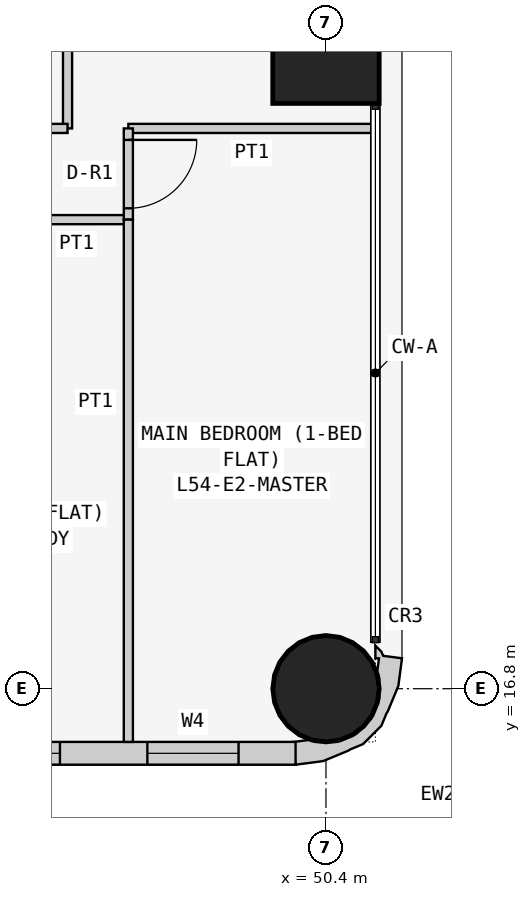
"""IFC4 building model, lengths in metres.
Left out: names, types, materials, properties, quantities, classifications, styles, units other than length and angle.
Written with IfcOpenShell. Run it as: python <this file> out.ifc"""

import sys

from ifc_helpers import new_model, si_unit, direction, frame, frame_2d, origin, origin_2d, place, context, subcontext, project, spatial, polyline, rectangle, circle, outline, extrude, element, fill, save


model = new_model("IFC4")
c1 = context("Model", 3, precision=1e-05, world=origin(), true_north=direction((0.0, 1.0)))
c2 = subcontext(c1, "Body", "Model", "MODEL_VIEW")
j1 = project(units=[si_unit("LENGTHUNIT", "METRE"), si_unit("PLANEANGLEUNIT", "RADIAN")], contexts=[c1])
p1 = place(None, origin())
s1 = spatial("IfcSite", under=j1, at=p1, CompositionType="ELEMENT")
p2 = place(p1, origin())
s2 = spatial("IfcBuilding", under=s1, at=p2, CompositionType="ELEMENT")
p3 = place(p2, frame((0.0, 0.0, 208.5)))
s3 = spatial("IfcBuildingStorey", under=s2, at=p3, CompositionType="ELEMENT", Elevation=208.5)
p4 = place(p3, frame((50.4, 16.8, 0.0), z_axis=(0.0, 0.0, 1.0), x_axis=(1.0, 0.0, 0.0)))
e1 = element("IfcColumn", 1, at=p4, inside=s3, PredefinedType="COLUMN", context=c2, shape_type="SweptSolid", body=[
    extrude(circle(Radius=0.7, at=origin_2d()), origin(), (0.0, 0.0, 1.0), 3.6),
])
p5 = place(p3, frame((50.4, 25.2, 0.0), z_axis=(0.0, 0.0, 1.0), x_axis=(1.0, 0.0, 0.0)))
e2 = element("IfcColumn", 2, at=p5, inside=s3, PredefinedType="COLUMN", context=c2, shape_type="SweptSolid", body=[
    extrude(rectangle(XDim=1.4, YDim=1.4, at=origin_2d()), origin(), (0.0, 0.0, 1.0), 3.6),
])
p6 = place(p3, frame((43.0, 15.95, 0.0), z_axis=(0.0, 0.0, 1.0), x_axis=(1.0, 0.0, 0.0)))
e3 = element("IfcWall", 3, at=p6, inside=s3, PredefinedType="SOLIDWALL", context=c2, shape_type="SweptSolid", body=[
    extrude(rectangle(XDim=7.0, YDim=0.3, at=frame_2d((3.5, 0.0))), origin(), (0.0, 0.0, 1.0), 3.45),
])
p7 = place(p6, frame((1.5, 0.0, 0.9)))
e4 = element("IfcOpeningElement", 4, at=p7, cuts=e3, PredefinedType="OPENING", context=c2, shape_type="SweptSolid", body=[
    extrude(rectangle(XDim=2.4, YDim=1.5, at=frame_2d((1.2, 0.75))), frame((0.0, 0.16, 0.0), z_axis=(0.0, -1.0, 0.0), x_axis=(1.0, 0.0, 0.0)), (0.0, 0.0, 1.0), 0.32),
])
p8 = place(p6, frame((5.05, 0.0, 0.9)))
e5 = element("IfcOpeningElement", 5, at=p8, cuts=e3, PredefinedType="OPENING", context=c2, shape_type="SweptSolid", body=[
    extrude(rectangle(XDim=1.2, YDim=1.5, at=frame_2d((0.6, 0.75))), frame((0.0, 0.16, 0.0), z_axis=(0.0, -1.0, 0.0), x_axis=(1.0, 0.0, 0.0)), (0.0, 0.0, 1.0), 0.32),
])
p9 = place(p3, frame((50.11, 16.076, 0.0), z_axis=(0.0, 0.0, 1.0), x_axis=(0.898030234854, -0.439933741929, 0.0)))
e6 = element("IfcWall", 6, at=p9, inside=s3, PredefinedType="SOLIDWALL", context=c2, shape_type="SweptSolid", body=[
    extrude(outline(polyline([(0.664, 1.577), (0.426, 1.497), (0.382, 1.536), (0.276, 1.572), (0.349, 1.423), (0.392, 1.444), (0.453, 1.261), (0.51, 1.211), (0.632, 0.961), (0.65, 0.683), (0.56, 0.419), (0.375, 0.21), (0.125, 0.087), (0.05, 0.082), (-0.128, -0.035), (-0.145, -0.044), (0.022, -0.296), (0.327, -0.094), (0.568, 0.18), (0.577, 0.199), (0.7, 0.337), (0.811, 0.661), (0.799, 0.846), (0.803, 0.866), (0.78, 1.231), (0.664, 1.577)])), origin(), (0.0, 0.0, 1.0), 3.45),
])
p10 = place(p3, frame((47.0, 29.4, 0.0), z_axis=(0.0, 0.0, 1.0), x_axis=(0.0, -1.0, 0.0)))
e7 = element("IfcWall", 7, at=p10, inside=s3, PredefinedType="PARTITIONING", context=c2, shape_type="SweptSolid", body=[
    extrude(rectangle(XDim=5.229, YDim=0.12, at=frame_2d((2.615, 0.0))), origin(), (0.0, 0.0, 1.0), 3.45),
])
p11 = place(p3, frame((47.0, 24.171, 0.0), z_axis=(0.0, 0.0, 1.0), x_axis=(-1.0, 0.0, 0.0)))
e8 = element("IfcWall", 8, at=p11, inside=s3, PredefinedType="PARTITIONING", context=c2, shape_type="SweptSolid", body=[
    extrude(rectangle(XDim=2.0, YDim=0.12, at=frame_2d((1.0, 0.0))), origin(), (0.0, 0.0, 1.0), 3.45),
])
p12 = place(p11, frame((0.55, 0.0, 0.0)))
e9 = element("IfcOpeningElement", 9, at=p12, cuts=e8, PredefinedType="OPENING", context=c2, shape_type="SweptSolid", body=[
    extrude(rectangle(XDim=0.9, YDim=2.1, at=frame_2d((0.45, 1.05))), frame((0.0, 0.07, 0.0), z_axis=(0.0, -1.0, 0.0), x_axis=(1.0, 0.0, 0.0)), (0.0, 0.0, 1.0), 0.14),
])
p13 = place(p3, frame((47.8, 22.971, 0.0), z_axis=(0.0, 0.0, 1.0), x_axis=(-1.0, 0.0, 0.0)))
e10 = element("IfcWall", 10, at=p13, inside=s3, PredefinedType="PARTITIONING", context=c2, shape_type="SweptSolid", body=[
    extrude(rectangle(XDim=3.4, YDim=0.12, at=frame_2d((1.7, 0.0))), origin(), (0.0, 0.0, 1.0), 3.45),
])
p14 = place(p13, frame((1.25, 0.0, 0.0)))
e11 = element("IfcOpeningElement", 11, at=p14, cuts=e10, PredefinedType="OPENING", context=c2, shape_type="SweptSolid", body=[
    extrude(rectangle(XDim=0.9, YDim=2.1, at=frame_2d((0.45, 1.05))), frame((0.0, 0.07, 0.0), z_axis=(0.0, -1.0, 0.0), x_axis=(1.0, 0.0, 0.0)), (0.0, 0.0, 1.0), 0.14),
])
p15 = place(p3, frame((51.05, 24.171, 0.0), z_axis=(0.0, 0.0, 1.0), x_axis=(-1.0, 0.0, 0.0)))
e12 = element("IfcWall", 12, at=p15, inside=s3, PredefinedType="PARTITIONING", context=c2, shape_type="SweptSolid", body=[
    extrude(rectangle(XDim=3.25, YDim=0.12, at=frame_2d((1.625, 0.0))), origin(), (0.0, 0.0, 1.0), 3.45),
])
p16 = place(p3, frame((47.8, 24.171, 0.0), z_axis=(0.0, 0.0, 1.0), x_axis=(0.0, -1.0, 0.0)))
e13 = element("IfcWall", 13, at=p16, inside=s3, PredefinedType="PARTITIONING", context=c2, shape_type="SweptSolid", body=[
    extrude(rectangle(XDim=1.2, YDim=0.12, at=frame_2d((0.6, 0.0))), origin(), (0.0, 0.0, 1.0), 3.45),
])
p17 = place(p16, frame((0.151, 0.0, 0.0)))
e14 = element("IfcOpeningElement", 14, at=p17, cuts=e13, PredefinedType="OPENING", context=c2, shape_type="SweptSolid", body=[
    extrude(rectangle(XDim=0.9, YDim=2.1, at=frame_2d((0.45, 1.05))), frame((0.0, 0.07, 0.0), z_axis=(0.0, -1.0, 0.0), x_axis=(1.0, 0.0, 0.0)), (0.0, 0.0, 1.0), 0.14),
])
p18 = place(p3, frame((47.8, 22.971, 0.0), z_axis=(0.0, 0.0, 1.0), x_axis=(0.0, -1.0, 0.0)))
e15 = element("IfcWall", 15, at=p18, inside=s3, PredefinedType="PARTITIONING", context=c2, shape_type="SweptSolid", body=[
    extrude(rectangle(XDim=6.871, YDim=0.12, at=frame_2d((3.436, 0.0))), origin(), (0.0, 0.0, 1.0), 3.45),
])
p19 = place(p7, origin())
e16 = element("IfcWindow", 16, at=p19, inside=s3, PartitioningType="SINGLE_PANEL", PredefinedType="WINDOW", context=c2, shape_type="SweptSolid", body=[
    extrude(rectangle(XDim=2.4, YDim=1.5, at=frame_2d((1.2, 0.75))), frame((0.0, 0.03, 0.0), z_axis=(0.0, -1.0, 0.0), x_axis=(1.0, 0.0, 0.0)), (0.0, 0.0, 1.0), 0.06),
])
fill(e4, e16)
p20 = place(p8, origin())
e17 = element("IfcWindow", 17, at=p20, inside=s3, PartitioningType="SINGLE_PANEL", PredefinedType="WINDOW", context=c2, shape_type="SweptSolid", body=[
    extrude(rectangle(XDim=1.2, YDim=1.5, at=frame_2d((0.6, 0.75))), frame((0.0, 0.03, 0.0), z_axis=(0.0, -1.0, 0.0), x_axis=(1.0, 0.0, 0.0)), (0.0, 0.0, 1.0), 0.06),
])
fill(e5, e17)
p21 = place(p17, origin())
e18 = element("IfcDoor", 18, at=p21, inside=s3, OperationType="SINGLE_SWING_LEFT", PredefinedType="DOOR", context=c2, shape_type="SweptSolid", body=[
    extrude(rectangle(XDim=0.9, YDim=2.1, at=frame_2d((0.45, 1.05))), frame((0.0, 0.025, 0.0), z_axis=(0.0, -1.0, 0.0), x_axis=(1.0, 0.0, 0.0)), (0.0, 0.0, 1.0), 0.05),
])
fill(e14, e18)
save(model, sys.argv[1])
